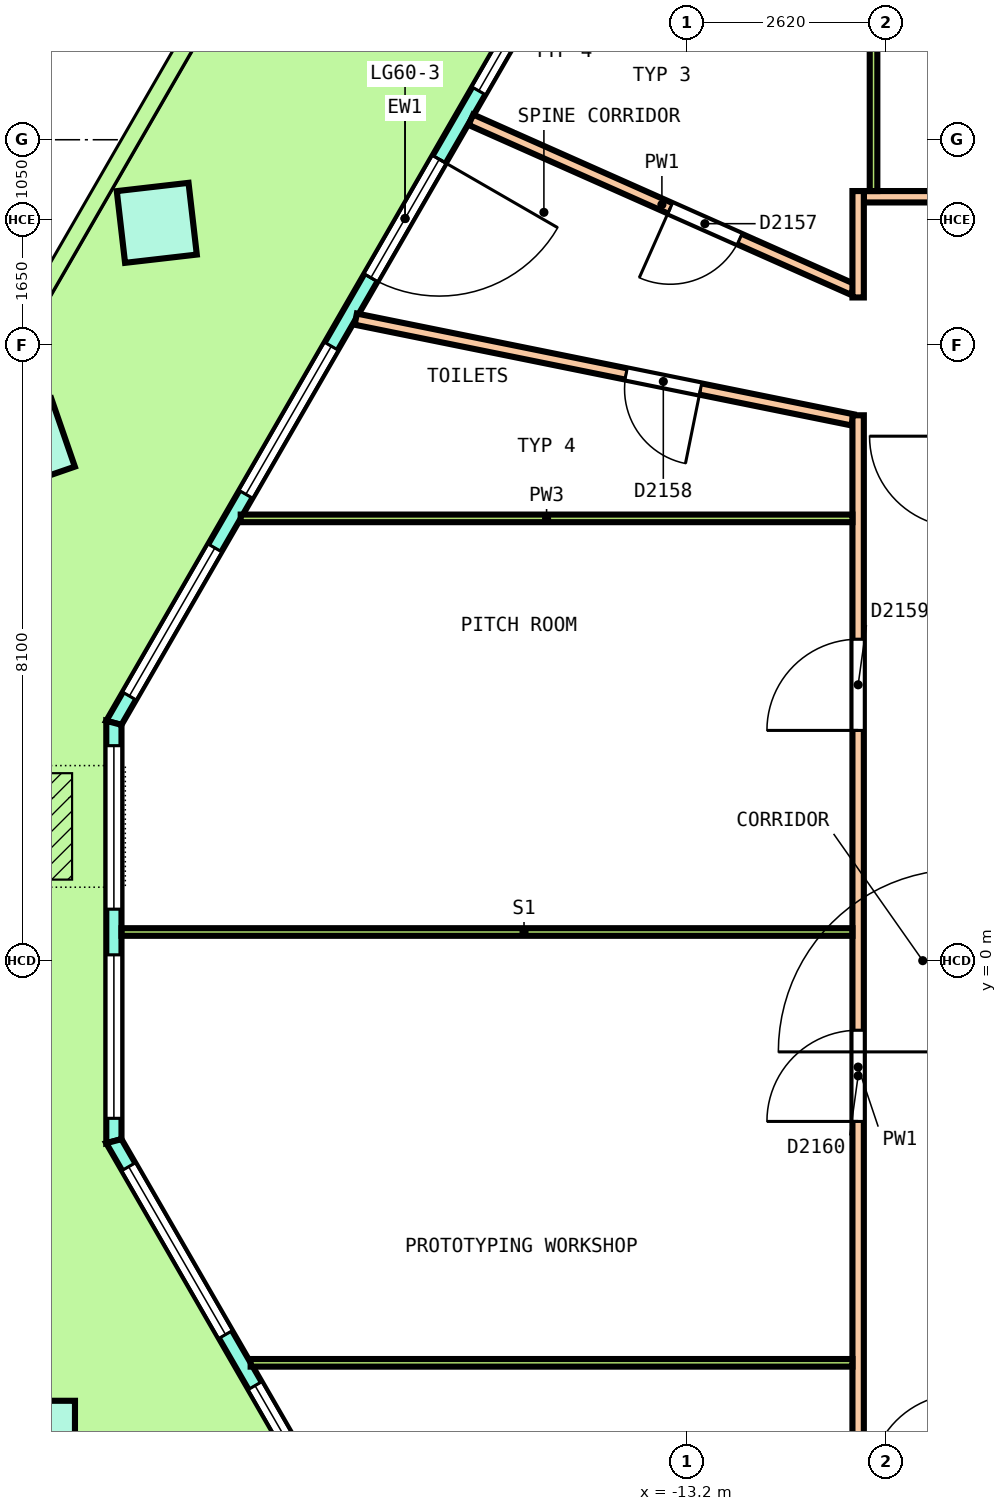
"""IFC4 building model, lengths in metres.
Left out: names, types, materials, properties, quantities, classifications, styles, units other than length and angle.
Written with IfcOpenShell. Run it as: python <this file> out.ifc"""

import sys

from ifc_helpers import new_model, si_unit, direction, frame, frame_2d, origin, origin_2d, place, context, subcontext, project, spatial, polyline, rectangle, outline, extrude, element, fill, save


model = new_model("IFC4")
c1 = context("Model", 3, precision=1e-05, world=origin(), true_north=direction((0.0, 1.0)))
c2 = subcontext(c1, "Body", "Model", "MODEL_VIEW")
j1 = project(units=[si_unit("LENGTHUNIT", "METRE"), si_unit("PLANEANGLEUNIT", "RADIAN")], contexts=[c1])
p1 = place(None, origin())
s1 = spatial("IfcSite", under=j1, at=p1, CompositionType="ELEMENT")
p2 = place(p1, origin())
s2 = spatial("IfcBuilding", under=s1, at=p2, CompositionType="ELEMENT")
p3 = place(p2, frame((0.0, 0.0, 275.0)))
s3 = spatial("IfcBuildingStorey", under=s2, at=p3, CompositionType="ELEMENT", Elevation=275.0)
p4 = place(p3, frame((-20.177, 9.707, 0.0), z_axis=(-0.025405368728, 0.018786601612, 0.999500690765), x_axis=(-0.498611651915, -0.866817929973, 0.00361895723)))
e1 = element("IfcColumn", 1, at=p4, inside=s3, PredefinedType="COLUMN", context=c2, shape_type="SweptSolid", body=[
    extrude(rectangle(XDim=0.95, YDim=0.95, at=origin_2d()), origin(), (0.0, 0.0, 1.0), 3.652),
])
p5 = place(p3, frame((-21.859, 6.793, 0.0), z_axis=(-0.021727164481, 0.02506980517, 0.999449566107), x_axis=(-0.500266190079, -0.865803780998, 0.010842134187)))
e2 = element("IfcColumn", 2, at=p5, inside=s3, PredefinedType="COLUMN", context=c2, shape_type="SweptSolid", body=[
    extrude(rectangle(XDim=0.95, YDim=0.95, at=origin_2d()), origin(), (0.0, 0.0, 1.0), 3.652),
])
p6 = place(p3, frame((-21.729, -6.265, 0.0), z_axis=(-0.010900423214, 0.018858400897, 0.999762742599), x_axis=(0.499728924135, -0.865907930491, 0.021782063614)))
e3 = element("IfcColumn", 3, at=p6, inside=s3, PredefinedType="COLUMN", context=c2, shape_type="SweptSolid", body=[
    extrude(rectangle(XDim=0.95, YDim=0.95, at=origin_2d()), origin(), (0.0, 0.0, 1.0), 3.651),
])
p7 = place(p3, frame((-13.08, 16.398, 0.0), z_axis=(0.0, 0.0, 1.0), x_axis=(-0.500005204625, -0.866022398872, 0.0)))
e4 = element("IfcWall", 4, at=p7, inside=s3, PredefinedType="SOLIDWALL", context=c2, shape_type="SweptSolid", body=[
    extrude(outline(polyline([(-0.027, -0.1), (0.998, -0.1), (2.023, -0.1), (3.048, -0.1), (4.073, -0.1), (5.098, -0.1), (6.124, -0.1), (7.148, -0.1), (8.174, -0.1), (9.198, -0.1), (10.224, -0.1), (11.249, -0.1), (12.274, -0.1), (13.299, -0.1), (14.324, -0.1), (15.349, -0.1), (15.295, 0.1), (14.277, 0.1), (13.259, 0.1), (12.241, 0.1), (11.224, 0.1), (10.206, 0.1), (9.188, 0.1), (8.17, 0.1), (7.152, 0.1), (6.134, 0.1), (5.116, 0.1), (4.098, 0.1), (3.081, 0.1), (2.063, 0.1), (1.045, 0.1), (0.027, 0.1), (-0.027, -0.1)])), origin(), (0.0, 0.0, 1.0), 3.7),
])
p8 = place(p7, frame((0.407, 0.0, 0.1)))
e5 = element("IfcOpeningElement", 5, at=p8, cuts=e4, PredefinedType="OPENING", context=c2, shape_type="SweptSolid", body=[
    extrude(rectangle(XDim=2.25, YDim=2.75, at=frame_2d((1.125, 1.375))), frame((0.0, 0.11, 0.0), z_axis=(0.0, -1.0, 0.0), x_axis=(1.0, 0.0, 0.0)), (0.0, 0.0, 1.0), 0.22),
])
p9 = place(p7, frame((3.472, 0.0, 0.1)))
e6 = element("IfcOpeningElement", 6, at=p9, cuts=e4, PredefinedType="OPENING", context=c2, shape_type="SweptSolid", body=[
    extrude(rectangle(XDim=2.25, YDim=2.75, at=frame_2d((1.125, 1.375))), frame((0.0, 0.11, 0.0), z_axis=(0.0, -1.0, 0.0), x_axis=(1.0, 0.0, 0.0)), (0.0, 0.0, 1.0), 0.22),
])
p10 = place(p7, frame((6.761, 0.0, 0.0)))
e7 = element("IfcOpeningElement", 7, at=p10, cuts=e4, PredefinedType="OPENING", context=c2, shape_type="SweptSolid", body=[
    extrude(rectangle(XDim=1.8, YDim=2.4, at=frame_2d((0.9, 1.2))), frame((0.0, 0.11, 0.0), z_axis=(0.0, -1.0, 0.0), x_axis=(1.0, 0.0, 0.0)), (0.0, 0.0, 1.0), 0.22),
])
p11 = place(p7, frame((6.761, 0.0, 2.55)))
e8 = element("IfcOpeningElement", 8, at=p11, cuts=e4, PredefinedType="OPENING", context=c2, shape_type="SweptSolid", body=[
    extrude(rectangle(XDim=1.8, YDim=0.3, at=frame_2d((0.9, 0.15))), frame((0.0, 0.11, 0.0), z_axis=(0.0, -1.0, 0.0), x_axis=(1.0, 0.0, 0.0)), (0.0, 0.0, 1.0), 0.22),
])
p12 = place(p7, frame((9.601, 0.0, 0.1)))
e9 = element("IfcOpeningElement", 9, at=p12, cuts=e4, PredefinedType="OPENING", context=c2, shape_type="SweptSolid", body=[
    extrude(rectangle(XDim=2.25, YDim=2.75, at=frame_2d((1.125, 1.375))), frame((0.0, 0.11, 0.0), z_axis=(0.0, -1.0, 0.0), x_axis=(1.0, 0.0, 0.0)), (0.0, 0.0, 1.0), 0.22),
])
p13 = place(p7, frame((12.665, 0.0, 0.1)))
e10 = element("IfcOpeningElement", 10, at=p13, cuts=e4, PredefinedType="OPENING", context=c2, shape_type="SweptSolid", body=[
    extrude(rectangle(XDim=2.25, YDim=2.75, at=frame_2d((1.125, 1.375))), frame((0.0, 0.11, 0.0), z_axis=(0.0, -1.0, 0.0), x_axis=(1.0, 0.0, 0.0)), (0.0, 0.0, 1.0), 0.22),
])
p14 = place(p3, frame((-20.741, 3.129, 0.0), z_axis=(0.0, 0.0, 1.0), x_axis=(0.0, -1.0, 0.0)))
e11 = element("IfcWall", 11, at=p14, inside=s3, PredefinedType="SOLIDWALL", context=c2, shape_type="SweptSolid", body=[
    extrude(outline(polyline([(-0.027, -0.1), (1.084, -0.1), (2.196, -0.1), (3.307, -0.1), (4.419, -0.1), (5.53, -0.1), (5.477, 0.1), (4.387, 0.1), (3.297, 0.1), (2.207, 0.1), (1.117, 0.1), (0.027, 0.1), (-0.027, -0.1)])), origin(), (0.0, 0.0, 1.0), 3.7),
])
p15 = place(p14, frame((0.301, 0.0, 0.1)))
e12 = element("IfcOpeningElement", 12, at=p15, cuts=e11, PredefinedType="OPENING", context=c2, shape_type="SweptSolid", body=[
    extrude(rectangle(XDim=2.15, YDim=2.75, at=frame_2d((1.075, 1.375))), frame((0.0, 0.11, 0.0), z_axis=(0.0, -1.0, 0.0), x_axis=(1.0, 0.0, 0.0)), (0.0, 0.0, 1.0), 0.22),
])
p16 = place(p14, frame((3.052, 0.0, 0.1)))
e13 = element("IfcOpeningElement", 13, at=p16, cuts=e11, PredefinedType="OPENING", context=c2, shape_type="SweptSolid", body=[
    extrude(rectangle(XDim=2.15, YDim=2.75, at=frame_2d((1.075, 1.375))), frame((0.0, 0.11, 0.0), z_axis=(0.0, -1.0, 0.0), x_axis=(1.0, 0.0, 0.0)), (0.0, 0.0, 1.0), 0.22),
])
p17 = place(p3, frame((-20.741, -2.375, 0.0), z_axis=(0.0, 0.0, 1.0), x_axis=(0.499993580544, -0.866029110027, 0.0)))
e14 = element("IfcWall", 14, at=p17, inside=s3, PredefinedType="SOLIDWALL", context=c2, shape_type="SweptSolid", body=[
    extrude(outline(polyline([(-0.027, -0.1), (1.016, -0.1), (2.058, -0.1), (3.101, -0.1), (4.144, -0.1), (5.186, -0.1), (6.229, -0.1), (7.272, -0.1), (8.314, -0.1), (9.357, -0.1), (10.4, -0.1), (11.442, -0.1), (12.485, -0.1), (13.528, -0.1), (14.57, -0.1), (15.613, -0.1), (16.656, -0.1), (16.602, 0.1), (15.566, 0.1), (14.53, 0.1), (13.494, 0.1), (12.458, 0.1), (11.422, 0.1), (10.386, 0.1), (9.35, 0.1), (8.314, 0.1), (7.278, 0.1), (6.242, 0.1), (5.207, 0.1), (4.171, 0.1), (3.135, 0.1), (2.099, 0.1), (1.063, 0.1), (0.027, 0.1), (-0.027, -0.1)])), origin(), (0.0, 0.0, 1.0), 3.7),
])
p18 = place(p17, frame((0.388, 0.0, 0.1)))
e15 = element("IfcOpeningElement", 15, at=p18, cuts=e14, PredefinedType="OPENING", context=c2, shape_type="SweptSolid", body=[
    extrude(rectangle(XDim=2.55, YDim=2.75, at=frame_2d((1.275, 1.375))), frame((0.0, 0.11, 0.0), z_axis=(0.0, -1.0, 0.0), x_axis=(1.0, 0.0, 0.0)), (0.0, 0.0, 1.0), 0.22),
])
p19 = place(p17, frame((3.714, 0.0, 0.1)))
e16 = element("IfcOpeningElement", 16, at=p19, cuts=e14, PredefinedType="OPENING", context=c2, shape_type="SweptSolid", body=[
    extrude(rectangle(XDim=2.55, YDim=2.75, at=frame_2d((1.275, 1.375))), frame((0.0, 0.11, 0.0), z_axis=(0.0, -1.0, 0.0), x_axis=(1.0, 0.0, 0.0)), (0.0, 0.0, 1.0), 0.22),
])
p20 = place(p17, frame((7.414, 0.0, 0.0)))
e17 = element("IfcOpeningElement", 17, at=p20, cuts=e14, PredefinedType="OPENING", context=c2, shape_type="SweptSolid", body=[
    extrude(rectangle(XDim=1.8, YDim=2.4, at=frame_2d((0.9, 1.2))), frame((0.0, 0.11, 0.0), z_axis=(0.0, -1.0, 0.0), x_axis=(1.0, 0.0, 0.0)), (0.0, 0.0, 1.0), 0.22),
])
p21 = place(p17, frame((7.414, 0.0, 2.55)))
e18 = element("IfcOpeningElement", 18, at=p21, cuts=e14, PredefinedType="OPENING", context=c2, shape_type="SweptSolid", body=[
    extrude(rectangle(XDim=1.8, YDim=0.3, at=frame_2d((0.9, 0.15))), frame((0.0, 0.11, 0.0), z_axis=(0.0, -1.0, 0.0), x_axis=(1.0, 0.0, 0.0)), (0.0, 0.0, 1.0), 0.22),
])
p22 = place(p17, frame((10.365, 0.0, 0.1)))
e19 = element("IfcOpeningElement", 19, at=p22, cuts=e14, PredefinedType="OPENING", context=c2, shape_type="SweptSolid", body=[
    extrude(rectangle(XDim=2.55, YDim=2.75, at=frame_2d((1.275, 1.375))), frame((0.0, 0.11, 0.0), z_axis=(0.0, -1.0, 0.0), x_axis=(1.0, 0.0, 0.0)), (0.0, 0.0, 1.0), 0.22),
])
p23 = place(p17, frame((13.691, 0.0, 0.1)))
e20 = element("IfcOpeningElement", 20, at=p23, cuts=e14, PredefinedType="OPENING", context=c2, shape_type="SweptSolid", body=[
    extrude(rectangle(XDim=2.55, YDim=2.75, at=frame_2d((1.275, 1.375))), frame((0.0, 0.11, 0.0), z_axis=(0.0, -1.0, 0.0), x_axis=(1.0, 0.0, 0.0)), (0.0, 0.0, 1.0), 0.22),
])
p24 = place(p3, frame((-16.045, 11.063, 0.0), z_axis=(0.0, 0.0, 1.0), x_axis=(0.913864623632, -0.406019026246, 0.0)))
e21 = element("IfcWall", 21, at=p24, inside=s3, PredefinedType="PARTITIONING", context=c2, shape_type="SweptSolid", body=[
    extrude(rectangle(XDim=5.5, YDim=0.15, at=frame_2d((2.75, 0.0))), origin(), (0.0, 0.0, 1.0), 2.9),
])
p25 = place(p24, frame((2.869, 0.0, 0.0)))
e22 = element("IfcOpeningElement", 22, at=p25, cuts=e21, PredefinedType="OPENING", context=c2, shape_type="SweptSolid", body=[
    extrude(rectangle(XDim=1.0, YDim=2.1, at=frame_2d((0.5, 1.05))), frame((0.0, 0.085, 0.0), z_axis=(0.0, -1.0, 0.0), x_axis=(1.0, 0.0, 0.0)), (0.0, 0.0, 1.0), 0.17),
])
p26 = place(p3, frame((-17.56, 8.44, 0.0), z_axis=(0.0, 0.0, 1.0), x_axis=(0.980059114806, -0.198706143552, 0.0)))
e23 = element("IfcWall", 23, at=p26, inside=s3, PredefinedType="PARTITIONING", context=c2, shape_type="SweptSolid", body=[
    extrude(rectangle(XDim=6.669, YDim=0.15, at=frame_2d((3.334, 0.0))), origin(), (0.0, 0.0, 1.0), 2.9),
])
p27 = place(p26, frame((3.629, 0.0, 0.0)))
e24 = element("IfcOpeningElement", 24, at=p27, cuts=e23, PredefinedType="OPENING", context=c2, shape_type="SweptSolid", body=[
    extrude(rectangle(XDim=1.0, YDim=2.1, at=frame_2d((0.5, 1.05))), frame((0.0, 0.085, 0.0), z_axis=(0.0, -1.0, 0.0), x_axis=(1.0, 0.0, 0.0)), (0.0, 0.0, 1.0), 0.17),
])
p28 = place(p3, frame((-10.875, 10.05, 0.0), z_axis=(0.0, 0.0, 1.0), x_axis=(1.0, 0.0, 0.0)))
e25 = element("IfcWall", 25, at=p28, inside=s3, PredefinedType="PARTITIONING", context=c2, shape_type="SweptSolid", body=[
    extrude(rectangle(XDim=21.75, YDim=0.15, at=frame_2d((10.875, 0.0))), origin(), (0.0, 0.0, 1.0), 2.9),
])
p29 = place(p28, frame((19.112, 0.0, 0.0)))
e26 = element("IfcOpeningElement", 26, at=p29, cuts=e25, PredefinedType="OPENING", context=c2, shape_type="SweptSolid", body=[
    extrude(rectangle(XDim=1.2, YDim=2.1, at=frame_2d((0.6, 1.05))), frame((0.0, 0.085, 0.0), z_axis=(0.0, -1.0, 0.0), x_axis=(1.0, 0.0, 0.0)), (0.0, 0.0, 1.0), 0.17),
])
p30 = place(p28, frame((11.491, 0.0, 0.0)))
e27 = element("IfcOpeningElement", 27, at=p30, cuts=e25, PredefinedType="OPENING", context=c2, shape_type="SweptSolid", body=[
    extrude(rectangle(XDim=1.2, YDim=2.1, at=frame_2d((0.6, 1.05))), frame((0.0, 0.085, 0.0), z_axis=(0.0, -1.0, 0.0), x_axis=(1.0, 0.0, 0.0)), (0.0, 0.0, 1.0), 0.17),
])
p31 = place(p28, frame((1.488, 0.0, 0.0)))
e28 = element("IfcOpeningElement", 28, at=p31, cuts=e25, PredefinedType="OPENING", context=c2, shape_type="SweptSolid", body=[
    extrude(rectangle(XDim=1.0, YDim=2.1, at=frame_2d((0.5, 1.05))), frame((0.0, 0.085, 0.0), z_axis=(0.0, -1.0, 0.0), x_axis=(1.0, 0.0, 0.0)), (0.0, 0.0, 1.0), 0.17),
])
p32 = place(p3, frame((-10.95, -9.975, 0.0), z_axis=(0.0, 0.0, 1.0), x_axis=(0.0, 1.0, 0.0)))
e29 = element("IfcWall", 29, at=p32, inside=s3, PredefinedType="PARTITIONING", context=c2, shape_type="SweptSolid", body=[
    extrude(rectangle(XDim=17.15, YDim=0.15, at=frame_2d((8.575, 0.0))), origin(), (0.0, 0.0, 1.0), 2.9),
])
p33 = place(p32, frame((13.004, 0.0, 0.0)))
e30 = element("IfcOpeningElement", 30, at=p33, cuts=e29, PredefinedType="OPENING", context=c2, shape_type="SweptSolid", body=[
    extrude(rectangle(XDim=1.2, YDim=2.1, at=frame_2d((0.6, 1.05))), frame((0.0, 0.085, 0.0), z_axis=(0.0, -1.0, 0.0), x_axis=(1.0, 0.0, 0.0)), (0.0, 0.0, 1.0), 0.17),
])
p34 = place(p32, frame((7.86, 0.0, 0.0)))
e31 = element("IfcOpeningElement", 31, at=p34, cuts=e29, PredefinedType="OPENING", context=c2, shape_type="SweptSolid", body=[
    extrude(rectangle(XDim=1.2, YDim=2.1, at=frame_2d((0.6, 1.05))), frame((0.0, 0.085, 0.0), z_axis=(0.0, -1.0, 0.0), x_axis=(1.0, 0.0, 0.0)), (0.0, 0.0, 1.0), 0.17),
])
p35 = place(p32, frame((2.263, 0.0, 0.0)))
e32 = element("IfcOpeningElement", 32, at=p35, cuts=e29, PredefinedType="OPENING", context=c2, shape_type="SweptSolid", body=[
    extrude(rectangle(XDim=1.0, YDim=2.1, at=frame_2d((0.5, 1.05))), frame((0.0, 0.085, 0.0), z_axis=(0.0, -1.0, 0.0), x_axis=(1.0, 0.0, 0.0)), (0.0, 0.0, 1.0), 0.17),
])
p36 = place(p3, frame((-10.95, 8.725, 0.0), z_axis=(0.0, 0.0, 1.0), x_axis=(0.0, 1.0, 0.0)))
e33 = element("IfcWall", 33, at=p36, inside=s3, PredefinedType="PARTITIONING", context=c2, shape_type="SweptSolid", body=[
    extrude(rectangle(XDim=1.4, YDim=0.15, at=frame_2d((0.7, 0.0))), origin(), (0.0, 0.0, 1.0), 2.9),
])
p37 = place(p3, frame((-20.642, 0.377, 0.0), z_axis=(0.0, 0.0, 1.0), x_axis=(1.0, 0.0, 0.0)))
e34 = element("IfcWall", 34, at=p37, inside=s3, PredefinedType="PARTITIONING", context=c2, shape_type="SweptSolid", body=[
    extrude(rectangle(XDim=9.617, YDim=0.1, at=frame_2d((4.808, 0.0))), origin(), (0.0, 0.0, 1.0), 2.9),
])
p38 = place(p3, frame((-10.747, 10.125, 0.0), z_axis=(0.0, 0.0, 1.0), x_axis=(0.0, 1.0, 0.0)))
e35 = element("IfcWall", 35, at=p38, inside=s3, PredefinedType="PARTITIONING", context=c2, shape_type="SweptSolid", body=[
    extrude(rectangle(XDim=7.505, YDim=0.1, at=frame_2d((3.752, 0.0))), origin(), (0.0, 0.0, 1.0), 2.9),
])
p39 = place(p3, frame((-19.073, 5.819, 0.0), z_axis=(0.0, 0.0, 1.0), x_axis=(1.0, 0.0, 0.0)))
e36 = element("IfcWall", 36, at=p39, inside=s3, PredefinedType="PARTITIONING", context=c2, shape_type="SweptSolid", body=[
    extrude(rectangle(XDim=8.048, YDim=0.1, at=frame_2d((4.024, 0.0))), origin(), (0.0, 0.0, 1.0), 2.9),
])
p40 = place(p3, frame((-18.942, -5.291, 0.0), z_axis=(0.0, 0.0, 1.0), x_axis=(1.0, 0.0, 0.0)))
e37 = element("IfcWall", 37, at=p40, inside=s3, PredefinedType="PARTITIONING", context=c2, shape_type="SweptSolid", body=[
    extrude(rectangle(XDim=7.917, YDim=0.1, at=frame_2d((3.959, 0.0))), origin(), (0.0, 0.0, 1.0), 2.9),
])
p41 = place(p9, origin())
e38 = element("IfcWindow", 38, at=p41, inside=s3, PartitioningType="SINGLE_PANEL", PredefinedType="WINDOW", context=c2, shape_type="SweptSolid", body=[
    extrude(rectangle(XDim=2.25, YDim=2.75, at=frame_2d((1.125, 1.375))), frame((0.0, 0.03, 0.0), z_axis=(0.0, -1.0, 0.0), x_axis=(1.0, 0.0, 0.0)), (0.0, 0.0, 1.0), 0.06),
])
fill(e6, e38)
p42 = place(p10, origin())
e39 = element("IfcDoor", 39, at=p42, inside=s3, OperationType="DOUBLE_DOOR_SINGLE_SWING", PredefinedType="DOOR", context=c2, shape_type="SweptSolid", body=[
    extrude(rectangle(XDim=1.8, YDim=2.4, at=frame_2d((0.9, 1.2))), frame((0.0, 0.025, 0.0), z_axis=(0.0, -1.0, 0.0), x_axis=(1.0, 0.0, 0.0)), (0.0, 0.0, 1.0), 0.05),
])
fill(e7, e39)
p43 = place(p11, origin())
e40 = element("IfcWindow", 40, at=p43, inside=s3, PartitioningType="SINGLE_PANEL", PredefinedType="WINDOW", context=c2, shape_type="SweptSolid", body=[
    extrude(rectangle(XDim=1.8, YDim=0.3, at=frame_2d((0.9, 0.15))), frame((0.0, 0.03, 0.0), z_axis=(0.0, -1.0, 0.0), x_axis=(1.0, 0.0, 0.0)), (0.0, 0.0, 1.0), 0.06),
])
fill(e8, e40)
p44 = place(p12, origin())
e41 = element("IfcWindow", 41, at=p44, inside=s3, PartitioningType="SINGLE_PANEL", PredefinedType="WINDOW", context=c2, shape_type="SweptSolid", body=[
    extrude(rectangle(XDim=2.25, YDim=2.75, at=frame_2d((1.125, 1.375))), frame((0.0, 0.03, 0.0), z_axis=(0.0, -1.0, 0.0), x_axis=(1.0, 0.0, 0.0)), (0.0, 0.0, 1.0), 0.06),
])
fill(e9, e41)
p45 = place(p13, origin())
e42 = element("IfcWindow", 42, at=p45, inside=s3, PartitioningType="SINGLE_PANEL", PredefinedType="WINDOW", context=c2, shape_type="SweptSolid", body=[
    extrude(rectangle(XDim=2.25, YDim=2.75, at=frame_2d((1.125, 1.375))), frame((0.0, 0.03, 0.0), z_axis=(0.0, -1.0, 0.0), x_axis=(1.0, 0.0, 0.0)), (0.0, 0.0, 1.0), 0.06),
])
fill(e10, e42)
p46 = place(p15, origin())
e43 = element("IfcWindow", 43, at=p46, inside=s3, PartitioningType="SINGLE_PANEL", PredefinedType="WINDOW", context=c2, shape_type="SweptSolid", body=[
    extrude(rectangle(XDim=2.15, YDim=2.75, at=frame_2d((1.075, 1.375))), frame((0.0, 0.03, 0.0), z_axis=(0.0, -1.0, 0.0), x_axis=(1.0, 0.0, 0.0)), (0.0, 0.0, 1.0), 0.06),
])
fill(e12, e43)
p47 = place(p16, origin())
e44 = element("IfcWindow", 44, at=p47, inside=s3, PartitioningType="SINGLE_PANEL", PredefinedType="WINDOW", context=c2, shape_type="SweptSolid", body=[
    extrude(rectangle(XDim=2.15, YDim=2.75, at=frame_2d((1.075, 1.375))), frame((0.0, 0.03, 0.0), z_axis=(0.0, -1.0, 0.0), x_axis=(1.0, 0.0, 0.0)), (0.0, 0.0, 1.0), 0.06),
])
fill(e13, e44)
p48 = place(p18, origin())
e45 = element("IfcWindow", 45, at=p48, inside=s3, PartitioningType="SINGLE_PANEL", PredefinedType="WINDOW", context=c2, shape_type="SweptSolid", body=[
    extrude(rectangle(XDim=2.55, YDim=2.75, at=frame_2d((1.275, 1.375))), frame((0.0, 0.03, 0.0), z_axis=(0.0, -1.0, 0.0), x_axis=(1.0, 0.0, 0.0)), (0.0, 0.0, 1.0), 0.06),
])
fill(e15, e45)
p49 = place(p19, origin())
e46 = element("IfcWindow", 46, at=p49, inside=s3, PartitioningType="SINGLE_PANEL", PredefinedType="WINDOW", context=c2, shape_type="SweptSolid", body=[
    extrude(rectangle(XDim=2.55, YDim=2.75, at=frame_2d((1.275, 1.375))), frame((0.0, 0.03, 0.0), z_axis=(0.0, -1.0, 0.0), x_axis=(1.0, 0.0, 0.0)), (0.0, 0.0, 1.0), 0.06),
])
fill(e16, e46)
p50 = place(p25, origin())
e47 = element("IfcDoor", 47, at=p50, inside=s3, OperationType="SINGLE_SWING_RIGHT", PredefinedType="DOOR", context=c2, shape_type="SweptSolid", body=[
    extrude(rectangle(XDim=1.0, YDim=2.1, at=frame_2d((0.5, 1.05))), frame((0.0, 0.025, 0.0), z_axis=(0.0, -1.0, 0.0), x_axis=(1.0, 0.0, 0.0)), (0.0, 0.0, 1.0), 0.05),
])
fill(e22, e47)
p51 = place(p27, origin())
e48 = element("IfcDoor", 48, at=p51, inside=s3, OperationType="SINGLE_SWING_RIGHT", PredefinedType="DOOR", context=c2, shape_type="SweptSolid", body=[
    extrude(rectangle(XDim=1.0, YDim=2.1, at=frame_2d((0.5, 1.05))), frame((0.0, 0.025, 0.0), z_axis=(0.0, -1.0, 0.0), x_axis=(1.0, 0.0, 0.0)), (0.0, 0.0, 1.0), 0.05),
])
fill(e24, e48)
p52 = place(p33, origin())
e49 = element("IfcDoor", 49, at=p52, inside=s3, OperationType="DOUBLE_DOOR_SINGLE_SWING", PredefinedType="DOOR", context=c2, shape_type="SweptSolid", body=[
    extrude(rectangle(XDim=1.2, YDim=2.1, at=frame_2d((0.6, 1.05))), frame((0.0, 0.025, 0.0), z_axis=(0.0, -1.0, 0.0), x_axis=(1.0, 0.0, 0.0)), (0.0, 0.0, 1.0), 0.05),
])
fill(e30, e49)
p53 = place(p34, origin())
e50 = element("IfcDoor", 50, at=p53, inside=s3, OperationType="DOUBLE_DOOR_SINGLE_SWING", PredefinedType="DOOR", context=c2, shape_type="SweptSolid", body=[
    extrude(rectangle(XDim=1.2, YDim=2.1, at=frame_2d((0.6, 1.05))), frame((0.0, 0.025, 0.0), z_axis=(0.0, -1.0, 0.0), x_axis=(1.0, 0.0, 0.0)), (0.0, 0.0, 1.0), 0.05),
])
fill(e31, e50)
save(model, sys.argv[1])
